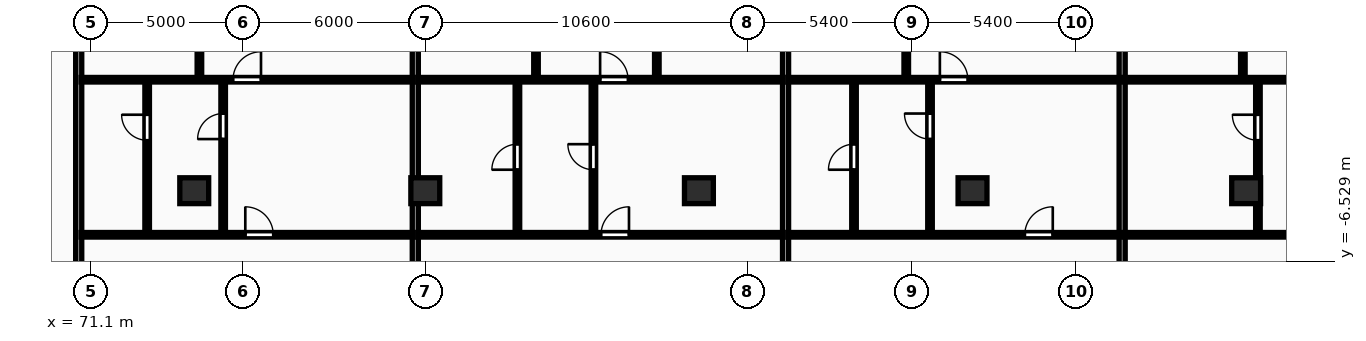
"""IFC4 building model, lengths in metres.
Left out: names, types, materials, properties, quantities, classifications, styles, units other than length and angle.
Written with IfcOpenShell. Run it as: python <this file> out.ifc"""

import sys

from ifc_helpers import new_model, si_unit, direction, frame, frame_2d, origin, origin_2d, place, context, subcontext, project, spatial, rectangle, extrude, element, fill, save


model = new_model("IFC4")
c1 = context("Model", 3, precision=1e-05, world=origin(), true_north=direction((0.0, 1.0)))
c2 = subcontext(c1, "Body", "Model", "MODEL_VIEW")
j1 = project(units=[si_unit("LENGTHUNIT", "METRE"), si_unit("PLANEANGLEUNIT", "RADIAN")], contexts=[c1])
p1 = place(None, origin())
s1 = spatial("IfcSite", under=j1, at=p1, CompositionType="ELEMENT")
p2 = place(p1, origin())
s2 = spatial("IfcBuilding", under=s1, at=p2, CompositionType="ELEMENT")
p3 = place(p2, frame((0.0, 0.0, 24.0)))
s3 = spatial("IfcBuildingStorey", under=s2, at=p3, CompositionType="ELEMENT", Elevation=24.0)
for number, where, z_axis, x_axis in (
    (1, (74.5, -4.2, 0.0), (0.0, 0.0, 1.0), (1.0, 0.0, 0.0)),
    (2, (82.1, -4.2, 0.0), (0.0, 0.0, 1.0), (1.0, 0.0, 0.0)),
    (3, (91.1, -4.2, 0.0), (0.0, 0.0, 1.0), (1.0, 0.0, 0.0)),
    (4, (100.1, -4.2, 0.0), (0.0, 0.0, 1.0), (1.0, 0.0, 0.0)),
    (5, (109.1, -4.2, 0.0), (0.0, 0.0, 1.0), (1.0, 0.0, 0.0)),
):
    element("IfcColumn", number, at=place(p3, frame(where, z_axis=z_axis, x_axis=x_axis)), inside=s3, PredefinedType="COLUMN", context=c2, shape_type="SweptSolid", body=[
        extrude(rectangle(XDim=0.95, YDim=0.85, at=origin_2d()), origin(), (0.0, 0.0, 1.0), 3.25),
    ])
p4 = place(p3, frame((70.7, -10.9, 0.0), z_axis=(0.0, 0.0, 1.0), x_axis=(0.0, 1.0, 0.0)))
e6 = element("IfcWall", 6, at=p4, inside=s3, PredefinedType="PARTITIONING", context=c2, shape_type="SweptSolid", body=[
    extrude(rectangle(XDim=27.07, YDim=0.2, at=frame_2d((13.535, 0.0))), origin(), (0.0, 0.0, 1.0), 2.97),
])
p5 = place(p3, frame((81.771, -10.9, 0.0), z_axis=(0.0, 0.0, 1.0), x_axis=(0.0, 1.0, 0.0)))
e7 = element("IfcWall", 7, at=p5, inside=s3, PredefinedType="PARTITIONING", context=c2, shape_type="SweptSolid", body=[
    extrude(rectangle(XDim=27.07, YDim=0.2, at=frame_2d((13.535, 0.0))), origin(), (0.0, 0.0, 1.0), 2.22),
])
p6 = place(p3, frame((74.67, -0.51, 0.0), z_axis=(0.0, 0.0, 1.0), x_axis=(0.0, 1.0, 0.0)))
e8 = element("IfcWall", 8, at=p6, inside=s3, PredefinedType="PARTITIONING", context=c2, shape_type="SweptSolid", body=[
    extrude(rectangle(XDim=16.7, YDim=0.15, at=frame_2d((8.35, 0.0))), origin(), (0.0, 0.0, 1.0), 2.22),
])
p7 = place(p6, frame((4.747, 0.0, 0.0)))
e9 = element("IfcOpeningElement", 9, at=p7, cuts=e8, PredefinedType="OPENING", context=c2, shape_type="SweptSolid", body=[
    extrude(rectangle(XDim=0.88, YDim=2.06, at=frame_2d((0.44, 1.03))), frame((0.0, 0.085, 0.0), z_axis=(0.0, -1.0, 0.0), x_axis=(1.0, 0.0, 0.0)), (0.0, 0.0, 1.0), 0.17),
])
p8 = place(p3, frame((72.951, -5.59, 0.0), z_axis=(0.0, 0.0, 1.0), x_axis=(0.0, 1.0, 0.0)))
e10 = element("IfcWall", 10, at=p8, inside=s3, PredefinedType="PARTITIONING", context=c2, shape_type="SweptSolid", body=[
    extrude(rectangle(XDim=5.0, YDim=0.15, at=frame_2d((2.5, 0.0))), origin(), (0.0, 0.0, 1.0), 2.97),
])
p9 = place(p8, frame((3.049, 0.0, 0.0)))
e11 = element("IfcOpeningElement", 11, at=p9, cuts=e10, PredefinedType="OPENING", context=c2, shape_type="SweptSolid", body=[
    extrude(rectangle(XDim=0.84, YDim=2.04, at=frame_2d((0.42, 1.02))), frame((0.0, 0.085, 0.0), z_axis=(0.0, -1.0, 0.0), x_axis=(1.0, 0.0, 0.0)), (0.0, 0.0, 1.0), 0.17),
])
p10 = place(p3, frame((75.451, -5.59, 0.0), z_axis=(0.0, 0.0, 1.0), x_axis=(0.0, 1.0, 0.0)))
e12 = element("IfcWall", 12, at=p10, inside=s3, PredefinedType="PARTITIONING", context=c2, shape_type="SweptSolid", body=[
    extrude(rectangle(XDim=5.0, YDim=0.15, at=frame_2d((2.5, 0.0))), origin(), (0.0, 0.0, 1.0), 2.97),
])
p11 = place(p10, frame((3.088, 0.0, 0.0)))
e13 = element("IfcOpeningElement", 13, at=p11, cuts=e12, PredefinedType="OPENING", context=c2, shape_type="SweptSolid", body=[
    extrude(rectangle(XDim=0.84, YDim=2.04, at=frame_2d((0.42, 1.02))), frame((0.0, 0.085, 0.0), z_axis=(0.0, -1.0, 0.0), x_axis=(1.0, 0.0, 0.0)), (0.0, 0.0, 1.0), 0.17),
])
p12 = place(p3, frame((70.78, -0.55, 0.0), z_axis=(0.0, 0.0, 1.0), x_axis=(1.0, 0.0, 0.0)))
e14 = element("IfcWall", 14, at=p12, inside=s3, PredefinedType="PARTITIONING", context=c2, shape_type="SweptSolid", body=[
    extrude(rectangle(XDim=10.911, YDim=0.15, at=frame_2d((5.456, 0.0))), origin(), (0.0, 0.0, 1.0), 2.97),
])
p13 = place(p12, frame((4.996, 0.0, 0.0)))
e15 = element("IfcOpeningElement", 15, at=p13, cuts=e14, PredefinedType="OPENING", context=c2, shape_type="SweptSolid", body=[
    extrude(rectangle(XDim=0.92, YDim=2.08, at=frame_2d((0.46, 1.04))), frame((0.0, 0.085, 0.0), z_axis=(0.0, -1.0, 0.0), x_axis=(1.0, 0.0, 0.0)), (0.0, 0.0, 1.0), 0.17),
])
p14 = place(p3, frame((70.78, -5.65, 0.0), z_axis=(0.0, 0.0, 1.0), x_axis=(1.0, 0.0, 0.0)))
e16 = element("IfcWall", 16, at=p14, inside=s3, PredefinedType="PARTITIONING", context=c2, shape_type="SweptSolid", body=[
    extrude(rectangle(XDim=10.911, YDim=0.15, at=frame_2d((5.456, 0.0))), origin(), (0.0, 0.0, 1.0), 2.97),
])
p15 = place(p14, frame((5.399, 0.0, 0.0)))
e17 = element("IfcOpeningElement", 17, at=p15, cuts=e16, PredefinedType="OPENING", context=c2, shape_type="SweptSolid", body=[
    extrude(rectangle(XDim=0.92, YDim=2.08, at=frame_2d((0.46, 1.04))), frame((0.0, 0.085, 0.0), z_axis=(0.0, -1.0, 0.0), x_axis=(1.0, 0.0, 0.0)), (0.0, 0.0, 1.0), 0.17),
])
p16 = place(p3, frame((93.95, -10.9, 0.0), z_axis=(0.0, 0.0, 1.0), x_axis=(0.0, 1.0, 0.0)))
e18 = element("IfcWall", 18, at=p16, inside=s3, PredefinedType="PARTITIONING", context=c2, shape_type="SweptSolid", body=[
    extrude(rectangle(XDim=27.07, YDim=0.2, at=frame_2d((13.535, 0.0))), origin(), (0.0, 0.0, 1.0), 2.97),
])
p17 = place(p3, frame((89.716, -0.51, 0.0), z_axis=(0.0, 0.0, 1.0), x_axis=(0.0, 1.0, 0.0)))
e19 = element("IfcWall", 19, at=p17, inside=s3, PredefinedType="PARTITIONING", context=c2, shape_type="SweptSolid", body=[
    extrude(rectangle(XDim=8.53, YDim=0.15, at=frame_2d((4.265, 0.0))), origin(), (0.0, 0.0, 1.0), 2.97),
])
p18 = place(p17, frame((3.845, 0.0, 0.0)))
e20 = element("IfcOpeningElement", 20, at=p18, cuts=e19, PredefinedType="OPENING", context=c2, shape_type="SweptSolid", body=[
    extrude(rectangle(XDim=0.84, YDim=2.04, at=frame_2d((0.42, 1.02))), frame((0.0, 0.085, 0.0), z_axis=(0.0, -1.0, 0.0), x_axis=(1.0, 0.0, 0.0)), (0.0, 0.0, 1.0), 0.17),
])
p19 = place(p3, frame((85.741, -0.51, 0.0), z_axis=(0.0, 0.0, 1.0), x_axis=(0.0, 1.0, 0.0)))
e21 = element("IfcWall", 21, at=p19, inside=s3, PredefinedType="PARTITIONING", context=c2, shape_type="SweptSolid", body=[
    extrude(rectangle(XDim=16.7, YDim=0.15, at=frame_2d((8.35, 0.0))), origin(), (0.0, 0.0, 1.0), 2.97),
])
p20 = place(p19, frame((7.4, 0.0, 0.0)))
e22 = element("IfcOpeningElement", 22, at=p20, cuts=e21, PredefinedType="OPENING", context=c2, shape_type="SweptSolid", body=[
    extrude(rectangle(XDim=0.88, YDim=2.06, at=frame_2d((0.44, 1.03))), frame((0.0, 0.085, 0.0), z_axis=(0.0, -1.0, 0.0), x_axis=(1.0, 0.0, 0.0)), (0.0, 0.0, 1.0), 0.17),
])
p21 = place(p3, frame((85.13, -5.59, 0.0), z_axis=(0.0, 0.0, 1.0), x_axis=(0.0, 1.0, 0.0)))
e23 = element("IfcWall", 23, at=p21, inside=s3, PredefinedType="PARTITIONING", context=c2, shape_type="SweptSolid", body=[
    extrude(rectangle(XDim=5.0, YDim=0.15, at=frame_2d((2.5, 0.0))), origin(), (0.0, 0.0, 1.0), 2.97),
])
p22 = place(p21, frame((2.08, 0.0, 0.0)))
e24 = element("IfcOpeningElement", 24, at=p22, cuts=e23, PredefinedType="OPENING", context=c2, shape_type="SweptSolid", body=[
    extrude(rectangle(XDim=0.84, YDim=2.04, at=frame_2d((0.42, 1.02))), frame((0.0, 0.085, 0.0), z_axis=(0.0, -1.0, 0.0), x_axis=(1.0, 0.0, 0.0)), (0.0, 0.0, 1.0), 0.17),
])
p23 = place(p3, frame((87.63, -5.59, 0.0), z_axis=(0.0, 0.0, 1.0), x_axis=(0.0, 1.0, 0.0)))
e25 = element("IfcWall", 25, at=p23, inside=s3, PredefinedType="PARTITIONING", context=c2, shape_type="SweptSolid", body=[
    extrude(rectangle(XDim=5.0, YDim=0.15, at=frame_2d((2.5, 0.0))), origin(), (0.0, 0.0, 1.0), 2.97),
])
p24 = place(p23, frame((2.08, 0.0, 0.0)))
e26 = element("IfcOpeningElement", 26, at=p24, cuts=e25, PredefinedType="OPENING", context=c2, shape_type="SweptSolid", body=[
    extrude(rectangle(XDim=0.84, YDim=2.04, at=frame_2d((0.42, 1.02))), frame((0.0, 0.085, 0.0), z_axis=(0.0, -1.0, 0.0), x_axis=(1.0, 0.0, 0.0)), (0.0, 0.0, 1.0), 0.17),
])
p25 = place(p3, frame((81.851, -0.55, 0.0), z_axis=(0.0, 0.0, 1.0), x_axis=(1.0, 0.0, 0.0)))
e27 = element("IfcWall", 27, at=p25, inside=s3, PredefinedType="PARTITIONING", context=c2, shape_type="SweptSolid", body=[
    extrude(rectangle(XDim=12.019, YDim=0.15, at=frame_2d((6.009, 0.0))), origin(), (0.0, 0.0, 1.0), 2.97),
])
p26 = place(p25, frame((5.999, 0.0, 0.0)))
e28 = element("IfcOpeningElement", 28, at=p26, cuts=e27, PredefinedType="OPENING", context=c2, shape_type="SweptSolid", body=[
    extrude(rectangle(XDim=0.92, YDim=2.08, at=frame_2d((0.46, 1.04))), frame((0.0, 0.085, 0.0), z_axis=(0.0, -1.0, 0.0), x_axis=(1.0, 0.0, 0.0)), (0.0, 0.0, 1.0), 0.17),
])
p27 = place(p3, frame((81.851, -5.65, 0.0), z_axis=(0.0, 0.0, 1.0), x_axis=(1.0, 0.0, 0.0)))
e29 = element("IfcWall", 29, at=p27, inside=s3, PredefinedType="PARTITIONING", context=c2, shape_type="SweptSolid", body=[
    extrude(rectangle(XDim=12.019, YDim=0.15, at=frame_2d((6.009, 0.0))), origin(), (0.0, 0.0, 1.0), 2.97),
])
p28 = place(p27, frame((6.029, 0.0, 0.0)))
e30 = element("IfcOpeningElement", 30, at=p28, cuts=e29, PredefinedType="OPENING", context=c2, shape_type="SweptSolid", body=[
    extrude(rectangle(XDim=0.92, YDim=2.08, at=frame_2d((0.46, 1.04))), frame((0.0, 0.085, 0.0), z_axis=(0.0, -1.0, 0.0), x_axis=(1.0, 0.0, 0.0)), (0.0, 0.0, 1.0), 0.17),
])
p29 = place(p3, frame((105.021, -10.9, 0.0), z_axis=(0.0, 0.0, 1.0), x_axis=(0.0, 1.0, 0.0)))
e31 = element("IfcWall", 31, at=p29, inside=s3, PredefinedType="PARTITIONING", context=c2, shape_type="SweptSolid", body=[
    extrude(rectangle(XDim=27.07, YDim=0.2, at=frame_2d((13.535, 0.0))), origin(), (0.0, 0.0, 1.0), 2.97),
])
p30 = place(p3, frame((97.92, -0.51, 0.0), z_axis=(0.0, 0.0, 1.0), x_axis=(0.0, 1.0, 0.0)))
e32 = element("IfcWall", 32, at=p30, inside=s3, PredefinedType="PARTITIONING", context=c2, shape_type="SweptSolid", body=[
    extrude(rectangle(XDim=16.7, YDim=0.15, at=frame_2d((8.35, 0.0))), origin(), (0.0, 0.0, 1.0), 2.97),
])
p31 = place(p30, frame((4.765, 0.0, 0.0)))
e33 = element("IfcOpeningElement", 33, at=p31, cuts=e32, PredefinedType="OPENING", context=c2, shape_type="SweptSolid", body=[
    extrude(rectangle(XDim=0.88, YDim=2.06, at=frame_2d((0.44, 1.03))), frame((0.0, 0.085, 0.0), z_axis=(0.0, -1.0, 0.0), x_axis=(1.0, 0.0, 0.0)), (0.0, 0.0, 1.0), 0.17),
])
p32 = place(p3, frame((96.201, -5.59, 0.0), z_axis=(0.0, 0.0, 1.0), x_axis=(0.0, 1.0, 0.0)))
e34 = element("IfcWall", 34, at=p32, inside=s3, PredefinedType="PARTITIONING", context=c2, shape_type="SweptSolid", body=[
    extrude(rectangle(XDim=5.0, YDim=0.15, at=frame_2d((2.5, 0.0))), origin(), (0.0, 0.0, 1.0), 2.97),
])
p33 = place(p32, frame((2.08, 0.0, 0.0)))
e35 = element("IfcOpeningElement", 35, at=p33, cuts=e34, PredefinedType="OPENING", context=c2, shape_type="SweptSolid", body=[
    extrude(rectangle(XDim=0.84, YDim=2.04, at=frame_2d((0.42, 1.02))), frame((0.0, 0.085, 0.0), z_axis=(0.0, -1.0, 0.0), x_axis=(1.0, 0.0, 0.0)), (0.0, 0.0, 1.0), 0.17),
])
p34 = place(p3, frame((98.701, -5.59, 0.0), z_axis=(0.0, 0.0, 1.0), x_axis=(0.0, 1.0, 0.0)))
e36 = element("IfcWall", 36, at=p34, inside=s3, PredefinedType="PARTITIONING", context=c2, shape_type="SweptSolid", body=[
    extrude(rectangle(XDim=5.0, YDim=0.15, at=frame_2d((2.5, 0.0))), origin(), (0.0, 0.0, 1.0), 2.97),
])
p35 = place(p34, frame((3.088, 0.0, 0.0)))
e37 = element("IfcOpeningElement", 37, at=p35, cuts=e36, PredefinedType="OPENING", context=c2, shape_type="SweptSolid", body=[
    extrude(rectangle(XDim=0.84, YDim=2.04, at=frame_2d((0.42, 1.02))), frame((0.0, 0.085, 0.0), z_axis=(0.0, -1.0, 0.0), x_axis=(1.0, 0.0, 0.0)), (0.0, 0.0, 1.0), 0.17),
])
p36 = place(p3, frame((94.03, -0.55, 0.0), z_axis=(0.0, 0.0, 1.0), x_axis=(1.0, 0.0, 0.0)))
e38 = element("IfcWall", 38, at=p36, inside=s3, PredefinedType="PARTITIONING", context=c2, shape_type="SweptSolid", body=[
    extrude(rectangle(XDim=10.911, YDim=0.15, at=frame_2d((5.456, 0.0))), origin(), (0.0, 0.0, 1.0), 2.97),
])
p37 = place(p36, frame((4.996, 0.0, 0.0)))
e39 = element("IfcOpeningElement", 39, at=p37, cuts=e38, PredefinedType="OPENING", context=c2, shape_type="SweptSolid", body=[
    extrude(rectangle(XDim=0.92, YDim=2.08, at=frame_2d((0.46, 1.04))), frame((0.0, 0.085, 0.0), z_axis=(0.0, -1.0, 0.0), x_axis=(1.0, 0.0, 0.0)), (0.0, 0.0, 1.0), 0.17),
])
p38 = place(p3, frame((94.03, -5.65, 0.0), z_axis=(0.0, 0.0, 1.0), x_axis=(1.0, 0.0, 0.0)))
e40 = element("IfcWall", 40, at=p38, inside=s3, PredefinedType="PARTITIONING", context=c2, shape_type="SweptSolid", body=[
    extrude(rectangle(XDim=10.911, YDim=0.15, at=frame_2d((5.456, 0.0))), origin(), (0.0, 0.0, 1.0), 2.97),
])
p39 = place(p38, frame((7.789, 0.0, 0.0)))
e41 = element("IfcOpeningElement", 41, at=p39, cuts=e40, PredefinedType="OPENING", context=c2, shape_type="SweptSolid", body=[
    extrude(rectangle(XDim=0.92, YDim=2.08, at=frame_2d((0.46, 1.04))), frame((0.0, 0.085, 0.0), z_axis=(0.0, -1.0, 0.0), x_axis=(1.0, 0.0, 0.0)), (0.0, 0.0, 1.0), 0.17),
])
p40 = place(p3, frame((108.991, -0.51, 0.0), z_axis=(0.0, 0.0, 1.0), x_axis=(0.0, 1.0, 0.0)))
e42 = element("IfcWall", 42, at=p40, inside=s3, PredefinedType="PARTITIONING", context=c2, shape_type="SweptSolid", body=[
    extrude(rectangle(XDim=16.7, YDim=0.15, at=frame_2d((8.35, 0.0))), origin(), (0.0, 0.0, 1.0), 2.22),
])
p41 = place(p40, frame((4.747, 0.0, 0.0)))
e43 = element("IfcOpeningElement", 43, at=p41, cuts=e42, PredefinedType="OPENING", context=c2, shape_type="SweptSolid", body=[
    extrude(rectangle(XDim=0.88, YDim=2.06, at=frame_2d((0.44, 1.03))), frame((0.0, 0.085, 0.0), z_axis=(0.0, -1.0, 0.0), x_axis=(1.0, 0.0, 0.0)), (0.0, 0.0, 1.0), 0.17),
])
p42 = place(p3, frame((109.487, -5.59, 0.0), z_axis=(0.0, 0.0, 1.0), x_axis=(0.0, 1.0, 0.0)))
e44 = element("IfcWall", 44, at=p42, inside=s3, PredefinedType="PARTITIONING", context=c2, shape_type="SweptSolid", body=[
    extrude(rectangle(XDim=5.0, YDim=0.15, at=frame_2d((2.5, 0.0))), origin(), (0.0, 0.0, 1.0), 2.22),
])
p43 = place(p42, frame((3.049, 0.0, 0.0)))
e45 = element("IfcOpeningElement", 45, at=p43, cuts=e44, PredefinedType="OPENING", context=c2, shape_type="SweptSolid", body=[
    extrude(rectangle(XDim=0.84, YDim=2.04, at=frame_2d((0.42, 1.02))), frame((0.0, 0.085, 0.0), z_axis=(0.0, -1.0, 0.0), x_axis=(1.0, 0.0, 0.0)), (0.0, 0.0, 1.0), 0.17),
])
p44 = place(p3, frame((105.101, -0.55, 0.0), z_axis=(0.0, 0.0, 1.0), x_axis=(1.0, 0.0, 0.0)))
e46 = element("IfcWall", 46, at=p44, inside=s3, PredefinedType="PARTITIONING", context=c2, shape_type="SweptSolid", body=[
    extrude(rectangle(XDim=13.126, YDim=0.15, at=frame_2d((6.563, 0.0))), origin(), (0.0, 0.0, 1.0), 2.97),
])
p45 = place(p44, frame((7.106, 0.0, 0.0)))
e47 = element("IfcOpeningElement", 47, at=p45, cuts=e46, PredefinedType="OPENING", context=c2, shape_type="SweptSolid", body=[
    extrude(rectangle(XDim=0.92, YDim=2.08, at=frame_2d((0.46, 1.04))), frame((0.0, 0.085, 0.0), z_axis=(0.0, -1.0, 0.0), x_axis=(1.0, 0.0, 0.0)), (0.0, 0.0, 1.0), 0.17),
])
p46 = place(p3, frame((105.101, -5.65, 0.0), z_axis=(0.0, 0.0, 1.0), x_axis=(1.0, 0.0, 0.0)))
e48 = element("IfcWall", 48, at=p46, inside=s3, PredefinedType="PARTITIONING", context=c2, shape_type="SweptSolid", body=[
    extrude(rectangle(XDim=13.126, YDim=0.15, at=frame_2d((6.563, 0.0))), origin(), (0.0, 0.0, 1.0), 2.97),
])
p47 = place(p46, frame((7.136, 0.0, 0.0)))
e49 = element("IfcOpeningElement", 49, at=p47, cuts=e48, PredefinedType="OPENING", context=c2, shape_type="SweptSolid", body=[
    extrude(rectangle(XDim=0.92, YDim=2.08, at=frame_2d((0.46, 1.04))), frame((0.0, 0.085, 0.0), z_axis=(0.0, -1.0, 0.0), x_axis=(1.0, 0.0, 0.0)), (0.0, 0.0, 1.0), 0.17),
])
p48 = place(p9, origin())
e50 = element("IfcDoor", 50, at=p48, inside=s3, OperationType="SINGLE_SWING_RIGHT", PredefinedType="DOOR", context=c2, shape_type="SweptSolid", body=[
    extrude(rectangle(XDim=0.84, YDim=2.04, at=frame_2d((0.42, 1.02))), frame((0.0, 0.025, 0.0), z_axis=(0.0, -1.0, 0.0), x_axis=(1.0, 0.0, 0.0)), (0.0, 0.0, 1.0), 0.05),
])
fill(e11, e50)
p49 = place(p11, origin())
e51 = element("IfcDoor", 51, at=p49, inside=s3, OperationType="SINGLE_SWING_LEFT", PredefinedType="DOOR", context=c2, shape_type="SweptSolid", body=[
    extrude(rectangle(XDim=0.84, YDim=2.04, at=frame_2d((0.42, 1.02))), frame((0.0, 0.025, 0.0), z_axis=(0.0, -1.0, 0.0), x_axis=(1.0, 0.0, 0.0)), (0.0, 0.0, 1.0), 0.05),
])
fill(e13, e51)
p50 = place(p13, origin())
e52 = element("IfcDoor", 52, at=p50, inside=s3, OperationType="SINGLE_SWING_RIGHT", PredefinedType="DOOR", context=c2, shape_type="SweptSolid", body=[
    extrude(rectangle(XDim=0.92, YDim=2.08, at=frame_2d((0.46, 1.04))), frame((0.0, 0.025, 0.0), z_axis=(0.0, -1.0, 0.0), x_axis=(1.0, 0.0, 0.0)), (0.0, 0.0, 1.0), 0.05),
])
fill(e15, e52)
p51 = place(p15, origin())
e53 = element("IfcDoor", 53, at=p51, inside=s3, OperationType="SINGLE_SWING_LEFT", PredefinedType="DOOR", context=c2, shape_type="SweptSolid", body=[
    extrude(rectangle(XDim=0.92, YDim=2.08, at=frame_2d((0.46, 1.04))), frame((0.0, 0.025, 0.0), z_axis=(0.0, -1.0, 0.0), x_axis=(1.0, 0.0, 0.0)), (0.0, 0.0, 1.0), 0.05),
])
fill(e17, e53)
p52 = place(p22, origin())
e54 = element("IfcDoor", 54, at=p52, inside=s3, OperationType="SINGLE_SWING_LEFT", PredefinedType="DOOR", context=c2, shape_type="SweptSolid", body=[
    extrude(rectangle(XDim=0.84, YDim=2.04, at=frame_2d((0.42, 1.02))), frame((0.0, 0.025, 0.0), z_axis=(0.0, -1.0, 0.0), x_axis=(1.0, 0.0, 0.0)), (0.0, 0.0, 1.0), 0.05),
])
fill(e24, e54)
p53 = place(p24, origin())
e55 = element("IfcDoor", 55, at=p53, inside=s3, OperationType="SINGLE_SWING_RIGHT", PredefinedType="DOOR", context=c2, shape_type="SweptSolid", body=[
    extrude(rectangle(XDim=0.84, YDim=2.04, at=frame_2d((0.42, 1.02))), frame((0.0, 0.025, 0.0), z_axis=(0.0, -1.0, 0.0), x_axis=(1.0, 0.0, 0.0)), (0.0, 0.0, 1.0), 0.05),
])
fill(e26, e55)
p54 = place(p26, origin())
e56 = element("IfcDoor", 56, at=p54, inside=s3, OperationType="SINGLE_SWING_LEFT", PredefinedType="DOOR", context=c2, shape_type="SweptSolid", body=[
    extrude(rectangle(XDim=0.92, YDim=2.08, at=frame_2d((0.46, 1.04))), frame((0.0, 0.025, 0.0), z_axis=(0.0, -1.0, 0.0), x_axis=(1.0, 0.0, 0.0)), (0.0, 0.0, 1.0), 0.05),
])
fill(e28, e56)
p55 = place(p28, origin())
e57 = element("IfcDoor", 57, at=p55, inside=s3, OperationType="SINGLE_SWING_RIGHT", PredefinedType="DOOR", context=c2, shape_type="SweptSolid", body=[
    extrude(rectangle(XDim=0.92, YDim=2.08, at=frame_2d((0.46, 1.04))), frame((0.0, 0.025, 0.0), z_axis=(0.0, -1.0, 0.0), x_axis=(1.0, 0.0, 0.0)), (0.0, 0.0, 1.0), 0.05),
])
fill(e30, e57)
p56 = place(p33, origin())
e58 = element("IfcDoor", 58, at=p56, inside=s3, OperationType="SINGLE_SWING_LEFT", PredefinedType="DOOR", context=c2, shape_type="SweptSolid", body=[
    extrude(rectangle(XDim=0.84, YDim=2.04, at=frame_2d((0.42, 1.02))), frame((0.0, 0.025, 0.0), z_axis=(0.0, -1.0, 0.0), x_axis=(1.0, 0.0, 0.0)), (0.0, 0.0, 1.0), 0.05),
])
fill(e35, e58)
p57 = place(p35, origin())
e59 = element("IfcDoor", 59, at=p57, inside=s3, OperationType="SINGLE_SWING_RIGHT", PredefinedType="DOOR", context=c2, shape_type="SweptSolid", body=[
    extrude(rectangle(XDim=0.84, YDim=2.04, at=frame_2d((0.42, 1.02))), frame((0.0, 0.025, 0.0), z_axis=(0.0, -1.0, 0.0), x_axis=(1.0, 0.0, 0.0)), (0.0, 0.0, 1.0), 0.05),
])
fill(e37, e59)
p58 = place(p37, origin())
e60 = element("IfcDoor", 60, at=p58, inside=s3, OperationType="SINGLE_SWING_LEFT", PredefinedType="DOOR", context=c2, shape_type="SweptSolid", body=[
    extrude(rectangle(XDim=0.92, YDim=2.08, at=frame_2d((0.46, 1.04))), frame((0.0, 0.025, 0.0), z_axis=(0.0, -1.0, 0.0), x_axis=(1.0, 0.0, 0.0)), (0.0, 0.0, 1.0), 0.05),
])
fill(e39, e60)
p59 = place(p39, origin())
e61 = element("IfcDoor", 61, at=p59, inside=s3, OperationType="SINGLE_SWING_RIGHT", PredefinedType="DOOR", context=c2, shape_type="SweptSolid", body=[
    extrude(rectangle(XDim=0.92, YDim=2.08, at=frame_2d((0.46, 1.04))), frame((0.0, 0.025, 0.0), z_axis=(0.0, -1.0, 0.0), x_axis=(1.0, 0.0, 0.0)), (0.0, 0.0, 1.0), 0.05),
])
fill(e41, e61)
p60 = place(p43, origin())
e62 = element("IfcDoor", 62, at=p60, inside=s3, OperationType="SINGLE_SWING_RIGHT", PredefinedType="DOOR", context=c2, shape_type="SweptSolid", body=[
    extrude(rectangle(XDim=0.84, YDim=2.04, at=frame_2d((0.42, 1.02))), frame((0.0, 0.025, 0.0), z_axis=(0.0, -1.0, 0.0), x_axis=(1.0, 0.0, 0.0)), (0.0, 0.0, 1.0), 0.05),
])
fill(e45, e62)
save(model, sys.argv[1])
